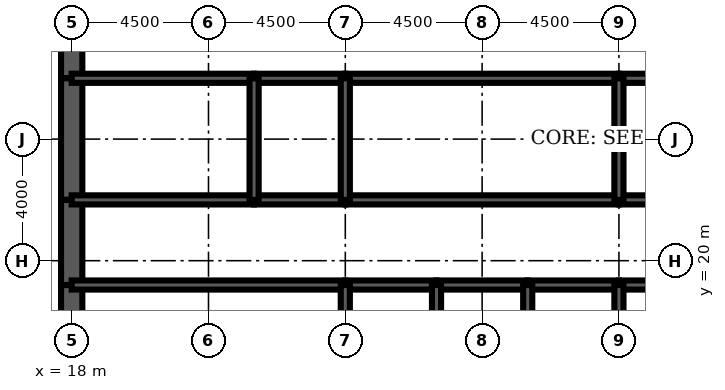
"""IFC4 building model, lengths in metres.
Left out: names, types, materials, properties, quantities, classifications, styles, units other than length and angle.
Written with IfcOpenShell. Run it as: python <this file> out.ifc"""

import sys

from ifc_helpers import new_model, si_unit, direction, frame, frame_2d, origin, place, context, subcontext, project, spatial, rectangle, extrude, element, fill, save


model = new_model("IFC4")
c1 = context("Model", 3, precision=1e-05, world=origin(), true_north=direction((0.0, 1.0)))
c2 = subcontext(c1, "Body", "Model", "MODEL_VIEW")
j1 = project(units=[si_unit("LENGTHUNIT", "METRE"), si_unit("PLANEANGLEUNIT", "RADIAN")], contexts=[c1])
p1 = place(None, origin())
s1 = spatial("IfcSite", under=j1, at=p1, CompositionType="ELEMENT")
p2 = place(p1, origin())
s2 = spatial("IfcBuilding", under=s1, at=p2, CompositionType="ELEMENT")
p3 = place(p2, frame((0.0, 0.0, 304.7)))
s3 = spatial("IfcBuildingStorey", under=s2, at=p3, CompositionType="ELEMENT", Elevation=304.7)
p4 = place(p3, frame((18.0, 28.8, 0.0), z_axis=(0.0, 0.0, 1.0), x_axis=(0.0, -1.0, 0.0)))
e1 = element("IfcWall", 1, at=p4, inside=s3, PredefinedType="SHEAR", context=c2, shape_type="SweptSolid", body=[
    extrude(rectangle(XDim=2.8, YDim=0.7, at=frame_2d((1.4, 0.0))), origin(), (0.0, 0.0, 1.0), 4.2),
])
p5 = place(p4, frame((0.4, 0.0, 0.0)))
e2 = element("IfcOpeningElement", 2, at=p5, cuts=e1, PredefinedType="OPENING", context=c2, shape_type="SweptSolid", body=[
    extrude(rectangle(XDim=1.8, YDim=2.1, at=frame_2d((0.9, 1.05))), frame((0.0, 0.36, 0.0), z_axis=(0.0, -1.0, 0.0), x_axis=(1.0, 0.0, 0.0)), (0.0, 0.0, 1.0), 0.72),
])
p6 = place(p3, frame((18.0, 26.0, 0.0), z_axis=(0.0, 0.0, 1.0), x_axis=(0.0, -1.0, 0.0)))
e3 = element("IfcWall", 3, at=p6, inside=s3, PredefinedType="SHEAR", context=c2, shape_type="SweptSolid", body=[
    extrude(rectangle(XDim=4.0, YDim=0.7, at=frame_2d((2.0, 0.0))), origin(), (0.0, 0.0, 1.0), 4.2),
])
p7 = place(p3, frame((18.0, 22.0, 0.0), z_axis=(0.0, 0.0, 1.0), x_axis=(0.0, -1.0, 0.0)))
e4 = element("IfcWall", 4, at=p7, inside=s3, PredefinedType="SHEAR", context=c2, shape_type="SweptSolid", body=[
    extrude(rectangle(XDim=2.8, YDim=0.7, at=frame_2d((1.4, 0.0))), origin(), (0.0, 0.0, 1.0), 4.2),
])
p8 = place(p7, frame((0.6, 0.0, 0.0)))
e5 = element("IfcOpeningElement", 5, at=p8, cuts=e4, PredefinedType="OPENING", context=c2, shape_type="SweptSolid", body=[
    extrude(rectangle(XDim=1.8, YDim=2.1, at=frame_2d((0.9, 1.05))), frame((0.0, 0.36, 0.0), z_axis=(0.0, -1.0, 0.0), x_axis=(1.0, 0.0, 0.0)), (0.0, 0.0, 1.0), 0.72),
])
p9 = place(p3, frame((18.0, 19.2, 0.0), z_axis=(0.0, 0.0, 1.0), x_axis=(0.0, -1.0, 0.0)))
e6 = element("IfcWall", 6, at=p9, inside=s3, PredefinedType="SHEAR", context=c2, shape_type="SweptSolid", body=[
    extrude(rectangle(XDim=3.2, YDim=0.7, at=frame_2d((1.6, 0.0))), origin(), (0.0, 0.0, 1.0), 4.2),
])
p10 = place(p3, frame((18.0, 19.2, 0.0), z_axis=(0.0, 0.0, 1.0), x_axis=(1.0, 0.0, 0.0)))
e7 = element("IfcWall", 7, at=p10, inside=s3, PredefinedType="SOLIDWALL", context=c2, shape_type="SweptSolid", body=[
    extrude(rectangle(XDim=9.0, YDim=0.3, at=frame_2d((4.5, 0.0))), origin(), (0.0, 0.0, 1.0), 4.2),
])
p11 = place(p10, frame((0.65, 0.0, 0.0)))
e8 = element("IfcOpeningElement", 8, at=p11, cuts=e7, PredefinedType="OPENING", context=c2, shape_type="SweptSolid", body=[
    extrude(rectangle(XDim=1.0, YDim=2.1, at=frame_2d((0.5, 1.05))), frame((0.0, 0.16, 0.0), z_axis=(0.0, -1.0, 0.0), x_axis=(1.0, 0.0, 0.0)), (0.0, 0.0, 1.0), 0.32),
])
p12 = place(p3, frame((27.0, 19.2, 0.0), z_axis=(0.0, 0.0, 1.0), x_axis=(1.0, 0.0, 0.0)))
e9 = element("IfcWall", 9, at=p12, inside=s3, PredefinedType="SOLIDWALL", context=c2, shape_type="SweptSolid", body=[
    extrude(rectangle(XDim=3.0, YDim=0.3, at=frame_2d((1.5, 0.0))), origin(), (0.0, 0.0, 1.0), 4.2),
])
p13 = place(p12, frame((0.95, 0.0, 0.0)))
e10 = element("IfcOpeningElement", 10, at=p13, cuts=e9, PredefinedType="OPENING", context=c2, shape_type="SweptSolid", body=[
    extrude(rectangle(XDim=1.1, YDim=2.2, at=frame_2d((0.55, 1.1))), frame((0.0, 0.16, 0.0), z_axis=(0.0, -1.0, 0.0), x_axis=(1.0, 0.0, 0.0)), (0.0, 0.0, 1.0), 0.32),
])
p14 = place(p3, frame((30.0, 19.2, 0.0), z_axis=(0.0, 0.0, 1.0), x_axis=(1.0, 0.0, 0.0)))
e11 = element("IfcWall", 11, at=p14, inside=s3, PredefinedType="SOLIDWALL", context=c2, shape_type="SweptSolid", body=[
    extrude(rectangle(XDim=3.0, YDim=0.3, at=frame_2d((1.5, 0.0))), origin(), (0.0, 0.0, 1.0), 4.2),
])
p15 = place(p14, frame((0.95, 0.0, 0.0)))
e12 = element("IfcOpeningElement", 12, at=p15, cuts=e11, PredefinedType="OPENING", context=c2, shape_type="SweptSolid", body=[
    extrude(rectangle(XDim=1.1, YDim=2.2, at=frame_2d((0.55, 1.1))), frame((0.0, 0.16, 0.0), z_axis=(0.0, -1.0, 0.0), x_axis=(1.0, 0.0, 0.0)), (0.0, 0.0, 1.0), 0.32),
])
p16 = place(p3, frame((33.0, 19.2, 0.0), z_axis=(0.0, 0.0, 1.0), x_axis=(1.0, 0.0, 0.0)))
e13 = element("IfcWall", 13, at=p16, inside=s3, PredefinedType="SOLIDWALL", context=c2, shape_type="SweptSolid", body=[
    extrude(rectangle(XDim=3.0, YDim=0.3, at=frame_2d((1.5, 0.0))), origin(), (0.0, 0.0, 1.0), 4.2),
])
p17 = place(p16, frame((0.95, 0.0, 0.0)))
e14 = element("IfcOpeningElement", 14, at=p17, cuts=e13, PredefinedType="OPENING", context=c2, shape_type="SweptSolid", body=[
    extrude(rectangle(XDim=1.1, YDim=2.2, at=frame_2d((0.55, 1.1))), frame((0.0, 0.16, 0.0), z_axis=(0.0, -1.0, 0.0), x_axis=(1.0, 0.0, 0.0)), (0.0, 0.0, 1.0), 0.32),
])
p18 = place(p3, frame((36.0, 19.2, 0.0), z_axis=(0.0, 0.0, 1.0), x_axis=(1.0, 0.0, 0.0)))
e15 = element("IfcWall", 15, at=p18, inside=s3, PredefinedType="SOLIDWALL", context=c2, shape_type="SweptSolid", body=[
    extrude(rectangle(XDim=3.0, YDim=0.3, at=frame_2d((1.5, 0.0))), origin(), (0.0, 0.0, 1.0), 4.2),
])
p19 = place(p18, frame((0.95, 0.0, 0.0)))
e16 = element("IfcOpeningElement", 16, at=p19, cuts=e15, PredefinedType="OPENING", context=c2, shape_type="SweptSolid", body=[
    extrude(rectangle(XDim=1.1, YDim=2.2, at=frame_2d((0.55, 1.1))), frame((0.0, 0.16, 0.0), z_axis=(0.0, -1.0, 0.0), x_axis=(1.0, 0.0, 0.0)), (0.0, 0.0, 1.0), 0.32),
])
p20 = place(p3, frame((18.0, 22.0, 0.0), z_axis=(0.0, 0.0, 1.0), x_axis=(1.0, 0.0, 0.0)))
e17 = element("IfcWall", 17, at=p20, inside=s3, PredefinedType="SOLIDWALL", context=c2, shape_type="SweptSolid", body=[
    extrude(rectangle(XDim=6.0, YDim=0.3, at=frame_2d((3.0, 0.0))), origin(), (0.0, 0.0, 1.0), 4.2),
])
p21 = place(p20, frame((4.4, 0.0, 0.0)))
e18 = element("IfcOpeningElement", 18, at=p21, cuts=e17, PredefinedType="OPENING", context=c2, shape_type="SweptSolid", body=[
    extrude(rectangle(XDim=1.0, YDim=2.1, at=frame_2d((0.5, 1.05))), frame((0.0, 0.16, 0.0), z_axis=(0.0, -1.0, 0.0), x_axis=(1.0, 0.0, 0.0)), (0.0, 0.0, 1.0), 0.32),
])
p22 = place(p20, frame((0.9, 0.0, 0.0)))
e19 = element("IfcOpeningElement", 19, at=p22, cuts=e17, PredefinedType="OPENING", context=c2, shape_type="SweptSolid", body=[
    extrude(rectangle(XDim=1.0, YDim=2.1, at=frame_2d((0.5, 1.05))), frame((0.0, 0.16, 0.0), z_axis=(0.0, -1.0, 0.0), x_axis=(1.0, 0.0, 0.0)), (0.0, 0.0, 1.0), 0.32),
])
p23 = place(p3, frame((24.0, 22.0, 0.0), z_axis=(0.0, 0.0, 1.0), x_axis=(1.0, 0.0, 0.0)))
e20 = element("IfcWall", 20, at=p23, inside=s3, PredefinedType="SOLIDWALL", context=c2, shape_type="SweptSolid", body=[
    extrude(rectangle(XDim=3.0, YDim=0.3, at=frame_2d((1.5, 0.0))), origin(), (0.0, 0.0, 1.0), 4.2),
])
p24 = place(p23, frame((1.0, 0.0, 0.0)))
e21 = element("IfcOpeningElement", 21, at=p24, cuts=e20, PredefinedType="OPENING", context=c2, shape_type="SweptSolid", body=[
    extrude(rectangle(XDim=1.0, YDim=2.1, at=frame_2d((0.5, 1.05))), frame((0.0, 0.16, 0.0), z_axis=(0.0, -1.0, 0.0), x_axis=(1.0, 0.0, 0.0)), (0.0, 0.0, 1.0), 0.32),
])
p25 = place(p3, frame((27.0, 22.0, 0.0), z_axis=(0.0, 0.0, 1.0), x_axis=(1.0, 0.0, 0.0)))
e22 = element("IfcWall", 22, at=p25, inside=s3, PredefinedType="SOLIDWALL", context=c2, shape_type="SweptSolid", body=[
    extrude(rectangle(XDim=9.0, YDim=0.3, at=frame_2d((4.5, 0.0))), origin(), (0.0, 0.0, 1.0), 4.2),
])
p26 = place(p25, frame((4.0, 0.0, 0.0)))
e23 = element("IfcOpeningElement", 23, at=p26, cuts=e22, PredefinedType="OPENING", context=c2, shape_type="SweptSolid", body=[
    extrude(rectangle(XDim=1.0, YDim=2.1, at=frame_2d((0.5, 1.05))), frame((0.0, 0.16, 0.0), z_axis=(0.0, -1.0, 0.0), x_axis=(1.0, 0.0, 0.0)), (0.0, 0.0, 1.0), 0.32),
])
p27 = place(p3, frame((36.0, 22.0, 0.0), z_axis=(0.0, 0.0, 1.0), x_axis=(1.0, 0.0, 0.0)))
e24 = element("IfcWall", 24, at=p27, inside=s3, PredefinedType="SOLIDWALL", context=c2, shape_type="SweptSolid", body=[
    extrude(rectangle(XDim=9.0, YDim=0.3, at=frame_2d((4.5, 0.0))), origin(), (0.0, 0.0, 1.0), 4.2),
])
p28 = place(p27, frame((4.0, 0.0, 0.0)))
e25 = element("IfcOpeningElement", 25, at=p28, cuts=e24, PredefinedType="OPENING", context=c2, shape_type="SweptSolid", body=[
    extrude(rectangle(XDim=1.0, YDim=2.1, at=frame_2d((0.5, 1.05))), frame((0.0, 0.16, 0.0), z_axis=(0.0, -1.0, 0.0), x_axis=(1.0, 0.0, 0.0)), (0.0, 0.0, 1.0), 0.32),
])
p29 = place(p3, frame((18.0, 26.0, 0.0), z_axis=(0.0, 0.0, 1.0), x_axis=(1.0, 0.0, 0.0)))
e26 = element("IfcWall", 26, at=p29, inside=s3, PredefinedType="SOLIDWALL", context=c2, shape_type="SweptSolid", body=[
    extrude(rectangle(XDim=6.0, YDim=0.3, at=frame_2d((3.0, 0.0))), origin(), (0.0, 0.0, 1.0), 4.2),
])
p30 = place(p3, frame((24.0, 26.0, 0.0), z_axis=(0.0, 0.0, 1.0), x_axis=(1.0, 0.0, 0.0)))
e27 = element("IfcWall", 27, at=p30, inside=s3, PredefinedType="SOLIDWALL", context=c2, shape_type="SweptSolid", body=[
    extrude(rectangle(XDim=3.0, YDim=0.3, at=frame_2d((1.5, 0.0))), origin(), (0.0, 0.0, 1.0), 4.2),
])
for number, where, z_axis, x_axis in (
    (28, (27.0, 26.0, 0.0), (0.0, 0.0, 1.0), (1.0, 0.0, 0.0)),
    (29, (36.0, 26.0, 0.0), (0.0, 0.0, 1.0), (1.0, 0.0, 0.0)),
):
    element("IfcWall", number, at=place(p3, frame(where, z_axis=z_axis, x_axis=x_axis)), inside=s3, PredefinedType="SOLIDWALL", context=c2, shape_type="SweptSolid", body=[
        extrude(rectangle(XDim=9.0, YDim=0.3, at=frame_2d((4.5, 0.0))), origin(), (0.0, 0.0, 1.0), 4.2),
    ])
for number, where, z_axis, x_axis in (
    (30, (27.0, 16.0, 0.0), (0.0, 0.0, 1.0), (0.0, 1.0, 0.0)),
    (31, (30.0, 16.0, 0.0), (0.0, 0.0, 1.0), (0.0, 1.0, 0.0)),
    (32, (33.0, 16.0, 0.0), (0.0, 0.0, 1.0), (0.0, 1.0, 0.0)),
    (33, (36.0, 16.0, 0.0), (0.0, 0.0, 1.0), (0.0, 1.0, 0.0)),
):
    element("IfcWall", number, at=place(p3, frame(where, z_axis=z_axis, x_axis=x_axis)), inside=s3, PredefinedType="SOLIDWALL", context=c2, shape_type="SweptSolid", body=[
        extrude(rectangle(XDim=3.2, YDim=0.3, at=frame_2d((1.6, 0.0))), origin(), (0.0, 0.0, 1.0), 4.2),
    ])
for number, where, z_axis, x_axis in (
    (34, (24.0, 22.0, 0.0), (0.0, 0.0, 1.0), (0.0, 1.0, 0.0)),
    (35, (27.0, 22.0, 0.0), (0.0, 0.0, 1.0), (0.0, 1.0, 0.0)),
    (36, (36.0, 22.0, 0.0), (0.0, 0.0, 1.0), (0.0, 1.0, 0.0)),
):
    element("IfcWall", number, at=place(p3, frame(where, z_axis=z_axis, x_axis=x_axis)), inside=s3, PredefinedType="SOLIDWALL", context=c2, shape_type="SweptSolid", body=[
        extrude(rectangle(XDim=4.0, YDim=0.3, at=frame_2d((2.0, 0.0))), origin(), (0.0, 0.0, 1.0), 4.2),
    ])
p31 = place(p3, frame((20.525, 22.15, 0.0), z_axis=(0.0, 0.0, 1.0), x_axis=(0.0, 1.0, 0.0)))
e37 = element("IfcWall", 37, at=p31, inside=s3, PredefinedType="PARTITIONING", context=c2, shape_type="SweptSolid", body=[
    extrude(rectangle(XDim=3.7, YDim=0.15, at=frame_2d((1.85, 0.0))), origin(), (0.0, 0.0, 1.0), 3.0),
])
p32 = place(p3, frame((24.5, 19.35, 0.0), z_axis=(0.0, 0.0, 1.0), x_axis=(0.0, 1.0, 0.0)))
e38 = element("IfcWall", 38, at=p32, inside=s3, PredefinedType="PARTITIONING", context=c2, shape_type="SweptSolid", body=[
    extrude(rectangle(XDim=2.5, YDim=0.15, at=frame_2d((1.25, 0.0))), origin(), (0.0, 0.0, 1.0), 3.0),
])
p33 = place(p32, frame((1.15, 0.0, 0.0)))
e39 = element("IfcOpeningElement", 39, at=p33, cuts=e38, PredefinedType="OPENING", context=c2, shape_type="SweptSolid", body=[
    extrude(rectangle(XDim=1.0, YDim=2.1, at=frame_2d((0.5, 1.05))), frame((0.0, 0.085, 0.0), z_axis=(0.0, -1.0, 0.0), x_axis=(1.0, 0.0, 0.0)), (0.0, 0.0, 1.0), 0.17),
])
p34 = place(p33, origin())
e40 = element("IfcDoor", 40, at=p34, inside=s3, OperationType="SINGLE_SWING_RIGHT", PredefinedType="DOOR", context=c2, shape_type="SweptSolid", body=[
    extrude(rectangle(XDim=1.0, YDim=2.1, at=frame_2d((0.5, 1.05))), frame((0.0, 0.025, 0.0), z_axis=(0.0, -1.0, 0.0), x_axis=(1.0, 0.0, 0.0)), (0.0, 0.0, 1.0), 0.05),
])
fill(e39, e40)
p35 = place(p13, origin())
e41 = element("IfcDoor", 41, at=p35, inside=s3, OperationType="DOUBLE_DOOR_SLIDING", PredefinedType="USERDEFINED", context=c2, shape_type="SweptSolid", body=[
    extrude(rectangle(XDim=1.1, YDim=2.2, at=frame_2d((0.55, 1.1))), frame((0.0, 0.025, 0.0), z_axis=(0.0, -1.0, 0.0), x_axis=(1.0, 0.0, 0.0)), (0.0, 0.0, 1.0), 0.05),
])
fill(e10, e41)
p36 = place(p15, origin())
e42 = element("IfcDoor", 42, at=p36, inside=s3, OperationType="DOUBLE_DOOR_SLIDING", PredefinedType="USERDEFINED", context=c2, shape_type="SweptSolid", body=[
    extrude(rectangle(XDim=1.1, YDim=2.2, at=frame_2d((0.55, 1.1))), frame((0.0, 0.025, 0.0), z_axis=(0.0, -1.0, 0.0), x_axis=(1.0, 0.0, 0.0)), (0.0, 0.0, 1.0), 0.05),
])
fill(e12, e42)
p37 = place(p17, origin())
e43 = element("IfcDoor", 43, at=p37, inside=s3, OperationType="DOUBLE_DOOR_SLIDING", PredefinedType="USERDEFINED", context=c2, shape_type="SweptSolid", body=[
    extrude(rectangle(XDim=1.1, YDim=2.2, at=frame_2d((0.55, 1.1))), frame((0.0, 0.025, 0.0), z_axis=(0.0, -1.0, 0.0), x_axis=(1.0, 0.0, 0.0)), (0.0, 0.0, 1.0), 0.05),
])
fill(e14, e43)
p38 = place(p11, origin())
e44 = element("IfcDoor", 44, at=p38, inside=s3, OperationType="SINGLE_SWING_LEFT", PredefinedType="DOOR", context=c2, shape_type="SweptSolid", body=[
    extrude(rectangle(XDim=1.0, YDim=2.1, at=frame_2d((0.5, 1.05))), frame((0.0, 0.025, 0.0), z_axis=(0.0, -1.0, 0.0), x_axis=(1.0, 0.0, 0.0)), (0.0, 0.0, 1.0), 0.05),
])
fill(e8, e44)
p39 = place(p8, origin())
e45 = element("IfcDoor", 45, at=p39, inside=s3, OperationType="SINGLE_SWING_LEFT", PredefinedType="DOOR", context=c2, shape_type="SweptSolid", body=[
    extrude(rectangle(XDim=1.8, YDim=2.1, at=frame_2d((0.9, 1.05))), frame((0.0, 0.35, 0.0), z_axis=(0.0, -1.0, 0.0), x_axis=(1.0, 0.0, 0.0)), (0.0, 0.0, 1.0), 0.699),
])
fill(e5, e45)
p40 = place(p5, origin())
e46 = element("IfcDoor", 46, at=p40, inside=s3, OperationType="SINGLE_SWING_LEFT", PredefinedType="DOOR", context=c2, shape_type="SweptSolid", body=[
    extrude(rectangle(XDim=1.8, YDim=2.1, at=frame_2d((0.9, 1.05))), frame((0.0, 0.35, 0.0), z_axis=(0.0, -1.0, 0.0), x_axis=(1.0, 0.0, 0.0)), (0.0, 0.0, 1.0), 0.699),
])
fill(e2, e46)
p41 = place(p21, origin())
e47 = element("IfcDoor", 47, at=p41, inside=s3, OperationType="SINGLE_SWING_RIGHT", PredefinedType="DOOR", context=c2, shape_type="SweptSolid", body=[
    extrude(rectangle(XDim=1.0, YDim=2.1, at=frame_2d((0.5, 1.05))), frame((0.0, 0.025, 0.0), z_axis=(0.0, -1.0, 0.0), x_axis=(1.0, 0.0, 0.0)), (0.0, 0.0, 1.0), 0.05),
])
fill(e18, e47)
p42 = place(p24, origin())
e48 = element("IfcDoor", 48, at=p42, inside=s3, OperationType="SINGLE_SWING_LEFT", PredefinedType="DOOR", context=c2, shape_type="SweptSolid", body=[
    extrude(rectangle(XDim=1.0, YDim=2.1, at=frame_2d((0.5, 1.05))), frame((0.0, 0.025, 0.0), z_axis=(0.0, -1.0, 0.0), x_axis=(1.0, 0.0, 0.0)), (0.0, 0.0, 1.0), 0.05),
])
fill(e21, e48)
p43 = place(p26, origin())
e49 = element("IfcDoor", 49, at=p43, inside=s3, OperationType="SINGLE_SWING_LEFT", PredefinedType="DOOR", context=c2, shape_type="SweptSolid", body=[
    extrude(rectangle(XDim=1.0, YDim=2.1, at=frame_2d((0.5, 1.05))), frame((0.0, 0.025, 0.0), z_axis=(0.0, -1.0, 0.0), x_axis=(1.0, 0.0, 0.0)), (0.0, 0.0, 1.0), 0.05),
])
fill(e23, e49)
p44 = place(p22, origin())
e50 = element("IfcDoor", 50, at=p44, inside=s3, OperationType="SINGLE_SWING_LEFT", PredefinedType="DOOR", context=c2, shape_type="SweptSolid", body=[
    extrude(rectangle(XDim=1.0, YDim=2.1, at=frame_2d((0.5, 1.05))), frame((0.0, 0.025, 0.0), z_axis=(0.0, -1.0, 0.0), x_axis=(1.0, 0.0, 0.0)), (0.0, 0.0, 1.0), 0.05),
])
fill(e19, e50)
save(model, sys.argv[1])
